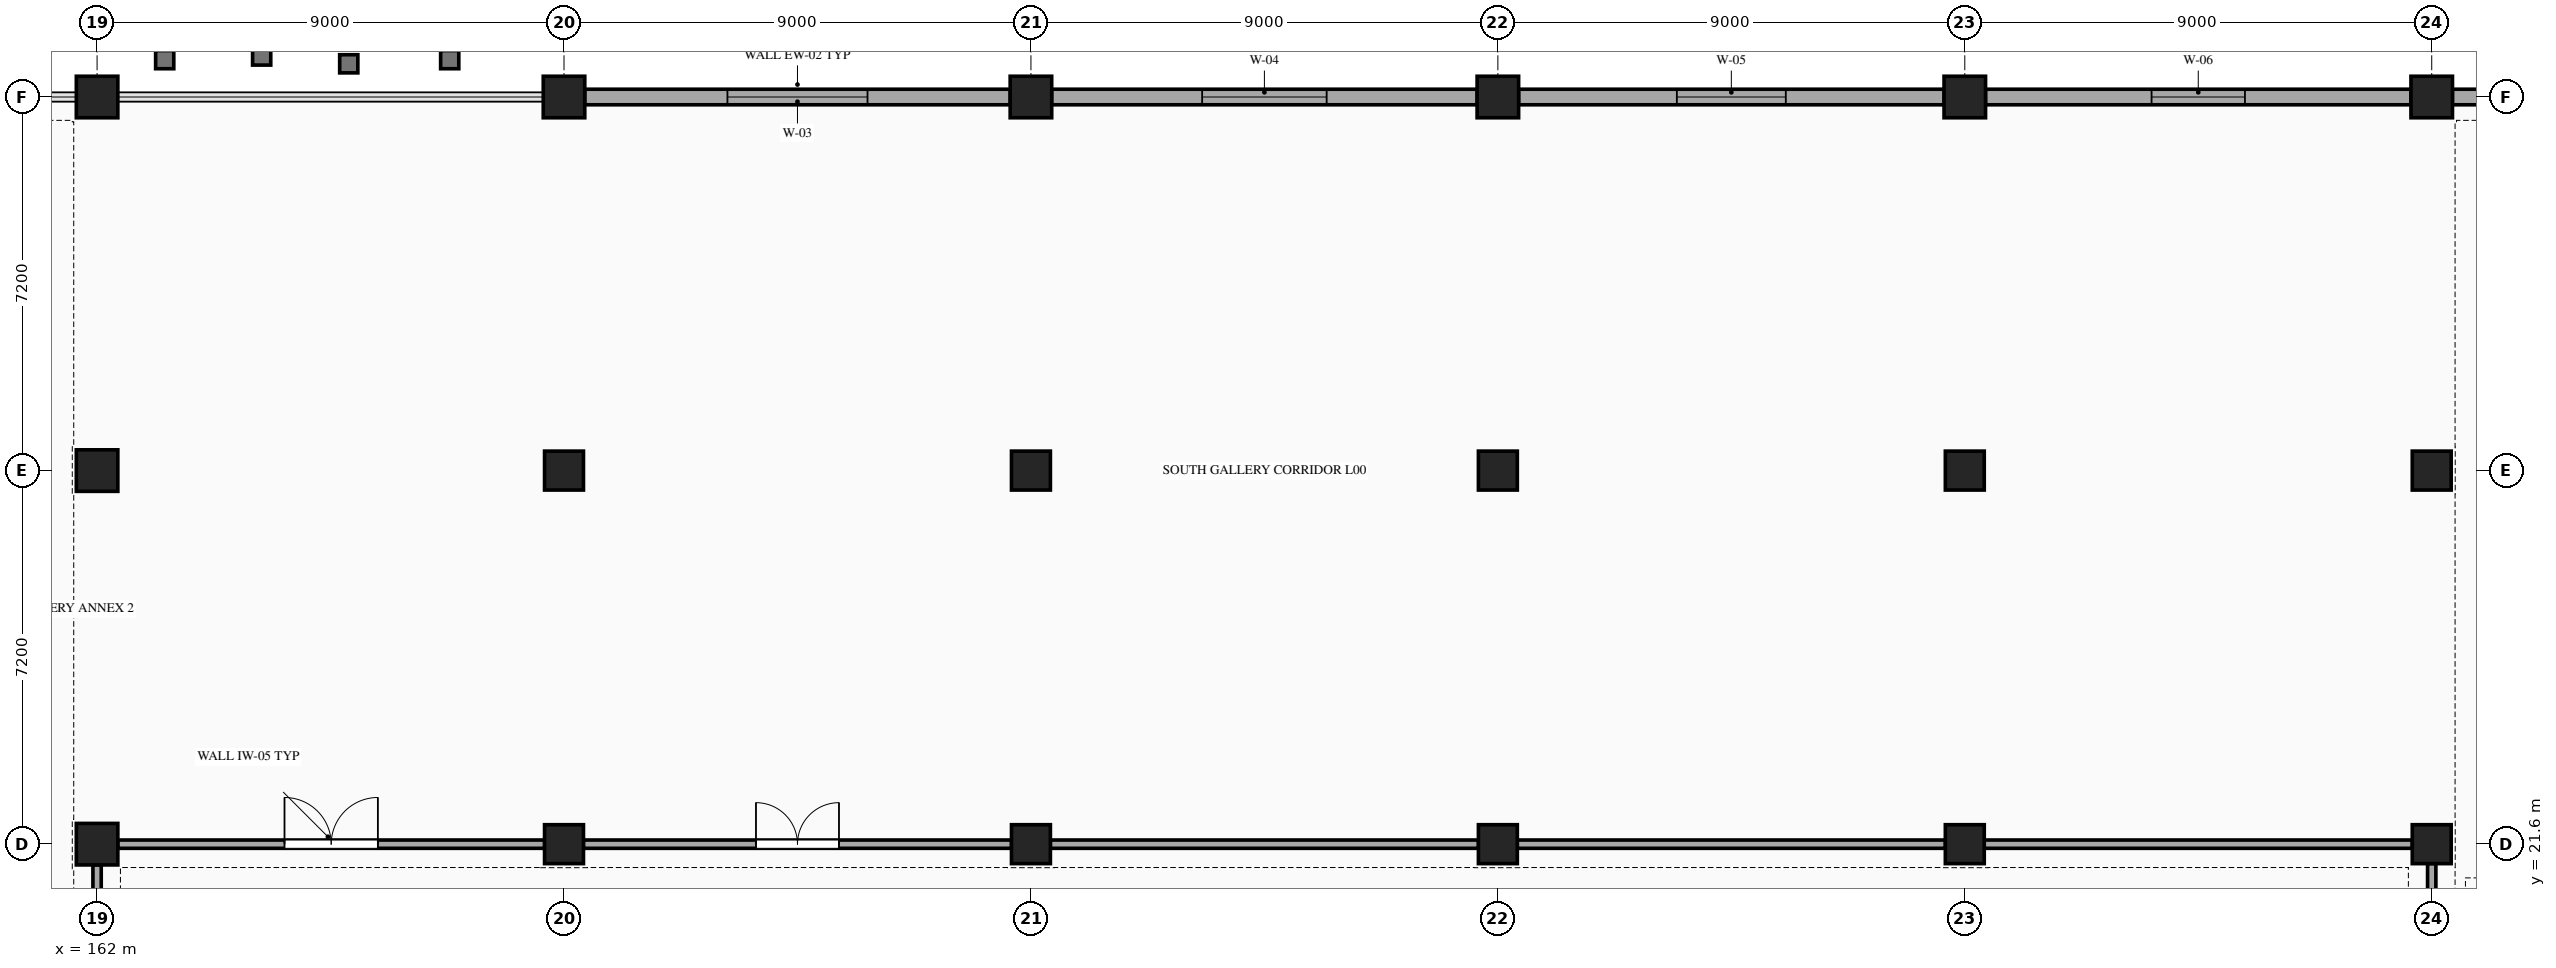
"""IFC4 building model, lengths in metres.
Left out: names, types, materials, properties, quantities, classifications, styles, units other than length and angle.
Written with IfcOpenShell. Run it as: python <this file> out.ifc"""

import sys

from ifc_helpers import new_model, si_unit, direction, frame, frame_2d, origin, origin_2d, place, context, subcontext, project, spatial, rectangle, extrude, element, fill, save


model = new_model("IFC4")
c1 = context("Model", 3, precision=1e-05, world=origin(), true_north=direction((0.0, 1.0)))
c2 = subcontext(c1, "Body", "Model", "MODEL_VIEW")
j1 = project(units=[si_unit("LENGTHUNIT", "METRE"), si_unit("PLANEANGLEUNIT", "RADIAN")], contexts=[c1])
p1 = place(None, origin())
s1 = spatial("IfcSite", under=j1, at=p1, CompositionType="ELEMENT")
p2 = place(p1, origin())
s2 = spatial("IfcBuilding", under=s1, at=p2, CompositionType="ELEMENT")
p3 = place(p2, origin())
s3 = spatial("IfcBuildingStorey", under=s2, at=p3, CompositionType="ELEMENT", Elevation=0.0)
for number, where, z_axis, x_axis in (
    (1, (162.0, 21.6, 0.0), (0.0, 0.0, 1.0), (1.0, 0.0, 0.0)),
    (2, (162.0, 28.8, 0.0), (0.0, 0.0, 1.0), (1.0, 0.0, 0.0)),
    (3, (162.0, 36.0, 0.0), (0.0, 0.0, 1.0), (1.0, 0.0, 0.0)),
):
    element("IfcColumn", number, at=place(p3, frame(where, z_axis=z_axis, x_axis=x_axis)), inside=s3, PredefinedType="COLUMN", context=c2, shape_type="SweptSolid", body=[
        extrude(rectangle(XDim=0.8, YDim=0.8, at=origin_2d()), origin(), (0.0, 0.0, 1.0), 5.4),
    ])
for number, where, z_axis, x_axis in (
    (4, (171.0, 21.6, 0.0), (0.0, 0.0, 1.0), (1.0, 0.0, 0.0)),
    (5, (171.0, 28.8, 0.0), (0.0, 0.0, 1.0), (1.0, 0.0, 0.0)),
):
    element("IfcColumn", number, at=place(p3, frame(where, z_axis=z_axis, x_axis=x_axis)), inside=s3, PredefinedType="COLUMN", context=c2, shape_type="SweptSolid", body=[
        extrude(rectangle(XDim=0.75, YDim=0.75, at=origin_2d()), origin(), (0.0, 0.0, 1.0), 5.4),
    ])
p4 = place(p3, frame((171.0, 36.0, 0.0), z_axis=(0.0, 0.0, 1.0), x_axis=(1.0, 0.0, 0.0)))
e6 = element("IfcColumn", 6, at=p4, inside=s3, PredefinedType="COLUMN", context=c2, shape_type="SweptSolid", body=[
    extrude(rectangle(XDim=0.8, YDim=0.8, at=origin_2d()), origin(), (0.0, 0.0, 1.0), 5.4),
])
for number, where, z_axis, x_axis in (
    (7, (180.0, 21.6, 0.0), (0.0, 0.0, 1.0), (1.0, 0.0, 0.0)),
    (8, (180.0, 28.8, 0.0), (0.0, 0.0, 1.0), (1.0, 0.0, 0.0)),
):
    element("IfcColumn", number, at=place(p3, frame(where, z_axis=z_axis, x_axis=x_axis)), inside=s3, PredefinedType="COLUMN", context=c2, shape_type="SweptSolid", body=[
        extrude(rectangle(XDim=0.75, YDim=0.75, at=origin_2d()), origin(), (0.0, 0.0, 1.0), 5.4),
    ])
p5 = place(p3, frame((180.0, 36.0, 0.0), z_axis=(0.0, 0.0, 1.0), x_axis=(1.0, 0.0, 0.0)))
e9 = element("IfcColumn", 9, at=p5, inside=s3, PredefinedType="COLUMN", context=c2, shape_type="SweptSolid", body=[
    extrude(rectangle(XDim=0.8, YDim=0.8, at=origin_2d()), origin(), (0.0, 0.0, 1.0), 5.4),
])
for number, where, z_axis, x_axis in (
    (10, (189.0, 21.6, 0.0), (0.0, 0.0, 1.0), (1.0, 0.0, 0.0)),
    (11, (189.0, 28.8, 0.0), (0.0, 0.0, 1.0), (1.0, 0.0, 0.0)),
):
    element("IfcColumn", number, at=place(p3, frame(where, z_axis=z_axis, x_axis=x_axis)), inside=s3, PredefinedType="COLUMN", context=c2, shape_type="SweptSolid", body=[
        extrude(rectangle(XDim=0.75, YDim=0.75, at=origin_2d()), origin(), (0.0, 0.0, 1.0), 5.4),
    ])
p6 = place(p3, frame((189.0, 36.0, 0.0), z_axis=(0.0, 0.0, 1.0), x_axis=(1.0, 0.0, 0.0)))
e12 = element("IfcColumn", 12, at=p6, inside=s3, PredefinedType="COLUMN", context=c2, shape_type="SweptSolid", body=[
    extrude(rectangle(XDim=0.8, YDim=0.8, at=origin_2d()), origin(), (0.0, 0.0, 1.0), 5.4),
])
for number, where, z_axis, x_axis in (
    (13, (198.0, 21.6, 0.0), (0.0, 0.0, 1.0), (1.0, 0.0, 0.0)),
    (14, (198.0, 28.8, 0.0), (0.0, 0.0, 1.0), (1.0, 0.0, 0.0)),
):
    element("IfcColumn", number, at=place(p3, frame(where, z_axis=z_axis, x_axis=x_axis)), inside=s3, PredefinedType="COLUMN", context=c2, shape_type="SweptSolid", body=[
        extrude(rectangle(XDim=0.75, YDim=0.75, at=origin_2d()), origin(), (0.0, 0.0, 1.0), 5.4),
    ])
p7 = place(p3, frame((198.0, 36.0, 0.0), z_axis=(0.0, 0.0, 1.0), x_axis=(1.0, 0.0, 0.0)))
e15 = element("IfcColumn", 15, at=p7, inside=s3, PredefinedType="COLUMN", context=c2, shape_type="SweptSolid", body=[
    extrude(rectangle(XDim=0.8, YDim=0.8, at=origin_2d()), origin(), (0.0, 0.0, 1.0), 5.4),
])
for number, where, z_axis, x_axis in (
    (16, (207.0, 21.6, 0.0), (0.0, 0.0, 1.0), (1.0, 0.0, 0.0)),
    (17, (207.0, 28.8, 0.0), (0.0, 0.0, 1.0), (1.0, 0.0, 0.0)),
):
    element("IfcColumn", number, at=place(p3, frame(where, z_axis=z_axis, x_axis=x_axis)), inside=s3, PredefinedType="COLUMN", context=c2, shape_type="SweptSolid", body=[
        extrude(rectangle(XDim=0.75, YDim=0.75, at=origin_2d()), origin(), (0.0, 0.0, 1.0), 5.4),
    ])
p8 = place(p3, frame((207.0, 36.0, 0.0), z_axis=(0.0, 0.0, 1.0), x_axis=(1.0, 0.0, 0.0)))
e18 = element("IfcColumn", 18, at=p8, inside=s3, PredefinedType="COLUMN", context=c2, shape_type="SweptSolid", body=[
    extrude(rectangle(XDim=0.8, YDim=0.8, at=origin_2d()), origin(), (0.0, 0.0, 1.0), 5.4),
])
p9 = place(p3, frame((171.398, 36.0, 0.0), z_axis=(0.0, 0.0, 1.0), x_axis=(1.0, 0.0, 0.0)))
e19 = element("IfcWall", 19, at=p9, inside=s3, PredefinedType="STANDARD", context=c2, shape_type="SweptSolid", body=[
    extrude(rectangle(XDim=8.204, YDim=0.3, at=frame_2d((4.102, 0.0))), origin(), (0.0, 0.0, 1.0), 4.747),
])
p10 = place(p9, frame((2.752, 0.0, 0.9)))
e20 = element("IfcOpeningElement", 20, at=p10, cuts=e19, PredefinedType="OPENING", context=c2, shape_type="SweptSolid", body=[
    extrude(rectangle(XDim=2.7, YDim=2.0, at=frame_2d((1.35, 1.0))), frame((0.0, 0.16, 0.0), z_axis=(0.0, -1.0, 0.0), x_axis=(1.0, 0.0, 0.0)), (0.0, 0.0, 1.0), 0.32),
])
p11 = place(p3, frame((180.398, 36.0, 0.0), z_axis=(0.0, 0.0, 1.0), x_axis=(1.0, 0.0, 0.0)))
e21 = element("IfcWall", 21, at=p11, inside=s3, PredefinedType="STANDARD", context=c2, shape_type="SweptSolid", body=[
    extrude(rectangle(XDim=8.204, YDim=0.3, at=frame_2d((4.102, 0.0))), origin(), (0.0, 0.0, 1.0), 4.747),
])
p12 = place(p11, frame((2.902, 0.0, 0.9)))
e22 = element("IfcOpeningElement", 22, at=p12, cuts=e21, PredefinedType="OPENING", context=c2, shape_type="SweptSolid", body=[
    extrude(rectangle(XDim=2.4, YDim=2.0, at=frame_2d((1.2, 1.0))), frame((0.0, 0.16, 0.0), z_axis=(0.0, -1.0, 0.0), x_axis=(1.0, 0.0, 0.0)), (0.0, 0.0, 1.0), 0.32),
])
p13 = place(p3, frame((189.398, 36.0, 0.0), z_axis=(0.0, 0.0, 1.0), x_axis=(1.0, 0.0, 0.0)))
e23 = element("IfcWall", 23, at=p13, inside=s3, PredefinedType="STANDARD", context=c2, shape_type="SweptSolid", body=[
    extrude(rectangle(XDim=8.204, YDim=0.3, at=frame_2d((4.102, 0.0))), origin(), (0.0, 0.0, 1.0), 4.747),
])
p14 = place(p13, frame((3.052, 0.0, 0.9)))
e24 = element("IfcOpeningElement", 24, at=p14, cuts=e23, PredefinedType="OPENING", context=c2, shape_type="SweptSolid", body=[
    extrude(rectangle(XDim=2.1, YDim=1.8, at=frame_2d((1.05, 0.9))), frame((0.0, 0.16, 0.0), z_axis=(0.0, -1.0, 0.0), x_axis=(1.0, 0.0, 0.0)), (0.0, 0.0, 1.0), 0.32),
])
p15 = place(p3, frame((198.398, 36.0, 0.0), z_axis=(0.0, 0.0, 1.0), x_axis=(1.0, 0.0, 0.0)))
e25 = element("IfcWall", 25, at=p15, inside=s3, PredefinedType="STANDARD", context=c2, shape_type="SweptSolid", body=[
    extrude(rectangle(XDim=8.204, YDim=0.3, at=frame_2d((4.102, 0.0))), origin(), (0.0, 0.0, 1.0), 4.747),
])
p16 = place(p15, frame((3.202, 0.0, 0.9)))
e26 = element("IfcOpeningElement", 26, at=p16, cuts=e25, PredefinedType="OPENING", context=c2, shape_type="SweptSolid", body=[
    extrude(rectangle(XDim=1.8, YDim=1.8, at=frame_2d((0.9, 0.9))), frame((0.0, 0.16, 0.0), z_axis=(0.0, -1.0, 0.0), x_axis=(1.0, 0.0, 0.0)), (0.0, 0.0, 1.0), 0.32),
])
p17 = place(p3, frame((207.398, 36.0, 0.0), z_axis=(0.0, 0.0, 1.0), x_axis=(1.0, 0.0, 0.0)))
e27 = element("IfcWall", 27, at=p17, inside=s3, PredefinedType="STANDARD", context=c2, shape_type="SweptSolid", body=[
    extrude(rectangle(XDim=8.204, YDim=0.3, at=frame_2d((4.102, 0.0))), origin(), (0.0, 0.0, 1.0), 4.747),
])
p18 = place(p17, frame((3.352, 0.0, 0.9)))
e28 = element("IfcOpeningElement", 28, at=p18, cuts=e27, PredefinedType="OPENING", context=c2, shape_type="SweptSolid", body=[
    extrude(rectangle(XDim=1.5, YDim=1.6, at=frame_2d((0.75, 0.8))), frame((0.0, 0.16, 0.0), z_axis=(0.0, -1.0, 0.0), x_axis=(1.0, 0.0, 0.0)), (0.0, 0.0, 1.0), 0.32),
])
p19 = place(p3, frame((162.398, 21.6, 0.0), z_axis=(0.0, 0.0, 1.0), x_axis=(1.0, 0.0, 0.0)))
e29 = element("IfcWall", 29, at=p19, inside=s3, PredefinedType="PARTITIONING", context=c2, shape_type="SweptSolid", body=[
    extrude(rectangle(XDim=8.229, YDim=0.16, at=frame_2d((4.115, 0.0))), origin(), (0.0, 0.0, 1.0), 4.264),
])
p20 = place(p19, frame((3.215, 0.0, 0.0)))
e30 = element("IfcOpeningElement", 30, at=p20, cuts=e29, PredefinedType="OPENING", context=c2, shape_type="SweptSolid", body=[
    extrude(rectangle(XDim=1.8, YDim=2.25, at=frame_2d((0.9, 1.125))), frame((0.0, 0.09, 0.0), z_axis=(0.0, -1.0, 0.0), x_axis=(1.0, 0.0, 0.0)), (0.0, 0.0, 1.0), 0.18),
])
p21 = place(p3, frame((171.373, 21.6, 0.0), z_axis=(0.0, 0.0, 1.0), x_axis=(1.0, 0.0, 0.0)))
e31 = element("IfcWall", 31, at=p21, inside=s3, PredefinedType="PARTITIONING", context=c2, shape_type="SweptSolid", body=[
    extrude(rectangle(XDim=8.254, YDim=0.16, at=frame_2d((4.127, 0.0))), origin(), (0.0, 0.0, 1.0), 4.264),
])
p22 = place(p21, frame((3.327, 0.0, 0.0)))
e32 = element("IfcOpeningElement", 32, at=p22, cuts=e31, PredefinedType="OPENING", context=c2, shape_type="SweptSolid", body=[
    extrude(rectangle(XDim=1.6, YDim=2.2, at=frame_2d((0.8, 1.1))), frame((0.0, 0.09, 0.0), z_axis=(0.0, -1.0, 0.0), x_axis=(1.0, 0.0, 0.0)), (0.0, 0.0, 1.0), 0.18),
])
for number, where, z_axis, x_axis in (
    (33, (180.373, 21.6, 0.0), (0.0, 0.0, 1.0), (1.0, 0.0, 0.0)),
    (34, (189.373, 21.6, 0.0), (0.0, 0.0, 1.0), (1.0, 0.0, 0.0)),
    (35, (198.373, 21.6, 0.0), (0.0, 0.0, 1.0), (1.0, 0.0, 0.0)),
):
    element("IfcWall", number, at=place(p3, frame(where, z_axis=z_axis, x_axis=x_axis)), inside=s3, PredefinedType="PARTITIONING", context=c2, shape_type="SweptSolid", body=[
        extrude(rectangle(XDim=8.254, YDim=0.16, at=frame_2d((4.127, 0.0))), origin(), (0.0, 0.0, 1.0), 4.264),
    ])
p23 = place(p3, frame((162.0, 14.798, 0.0), z_axis=(0.0, 0.0, 1.0), x_axis=(0.0, 1.0, 0.0)))
e36 = element("IfcWall", 36, at=p23, inside=s3, PredefinedType="PARTITIONING", context=c2, shape_type="SweptSolid", body=[
    extrude(rectangle(XDim=6.404, YDim=0.16, at=frame_2d((3.202, 0.0))), origin(), (0.0, 0.0, 1.0), 4.264),
])
p24 = place(p3, frame((207.0, 14.773, 0.0), z_axis=(0.0, 0.0, 1.0), x_axis=(0.0, 1.0, 0.0)))
e37 = element("IfcWall", 37, at=p24, inside=s3, PredefinedType="PARTITIONING", context=c2, shape_type="SweptSolid", body=[
    extrude(rectangle(XDim=6.454, YDim=0.16, at=frame_2d((3.227, 0.0))), origin(), (0.0, 0.0, 1.0), 4.264),
])
p25 = place(p10, origin())
e38 = element("IfcWindow", 38, at=p25, inside=s3, PartitioningType="SINGLE_PANEL", PredefinedType="WINDOW", context=c2, shape_type="SweptSolid", body=[
    extrude(rectangle(XDim=2.7, YDim=2.0, at=frame_2d((1.35, 1.0))), frame((0.0, 0.03, 0.0), z_axis=(0.0, -1.0, 0.0), x_axis=(1.0, 0.0, 0.0)), (0.0, 0.0, 1.0), 0.06),
])
fill(e20, e38)
p26 = place(p12, origin())
e39 = element("IfcWindow", 39, at=p26, inside=s3, PartitioningType="SINGLE_PANEL", PredefinedType="WINDOW", context=c2, shape_type="SweptSolid", body=[
    extrude(rectangle(XDim=2.4, YDim=2.0, at=frame_2d((1.2, 1.0))), frame((0.0, 0.03, 0.0), z_axis=(0.0, -1.0, 0.0), x_axis=(1.0, 0.0, 0.0)), (0.0, 0.0, 1.0), 0.06),
])
fill(e22, e39)
p27 = place(p14, origin())
e40 = element("IfcWindow", 40, at=p27, inside=s3, PartitioningType="SINGLE_PANEL", PredefinedType="WINDOW", context=c2, shape_type="SweptSolid", body=[
    extrude(rectangle(XDim=2.1, YDim=1.8, at=frame_2d((1.05, 0.9))), frame((0.0, 0.03, 0.0), z_axis=(0.0, -1.0, 0.0), x_axis=(1.0, 0.0, 0.0)), (0.0, 0.0, 1.0), 0.06),
])
fill(e24, e40)
p28 = place(p16, origin())
e41 = element("IfcWindow", 41, at=p28, inside=s3, PartitioningType="SINGLE_PANEL", PredefinedType="WINDOW", context=c2, shape_type="SweptSolid", body=[
    extrude(rectangle(XDim=1.8, YDim=1.8, at=frame_2d((0.9, 0.9))), frame((0.0, 0.03, 0.0), z_axis=(0.0, -1.0, 0.0), x_axis=(1.0, 0.0, 0.0)), (0.0, 0.0, 1.0), 0.06),
])
fill(e26, e41)
p29 = place(p20, origin())
e42 = element("IfcDoor", 42, at=p29, inside=s3, OperationType="DOUBLE_DOOR_SINGLE_SWING", PredefinedType="DOOR", context=c2, shape_type="SweptSolid", body=[
    extrude(rectangle(XDim=1.8, YDim=2.25, at=frame_2d((0.9, 1.125))), frame((0.0, 0.025, 0.0), z_axis=(0.0, -1.0, 0.0), x_axis=(1.0, 0.0, 0.0)), (0.0, 0.0, 1.0), 0.05),
])
fill(e30, e42)
p30 = place(p22, origin())
e43 = element("IfcDoor", 43, at=p30, inside=s3, OperationType="DOUBLE_DOOR_SINGLE_SWING", PredefinedType="DOOR", context=c2, shape_type="SweptSolid", body=[
    extrude(rectangle(XDim=1.6, YDim=2.2, at=frame_2d((0.8, 1.1))), frame((0.0, 0.025, 0.0), z_axis=(0.0, -1.0, 0.0), x_axis=(1.0, 0.0, 0.0)), (0.0, 0.0, 1.0), 0.05),
])
fill(e32, e43)
save(model, sys.argv[1])
